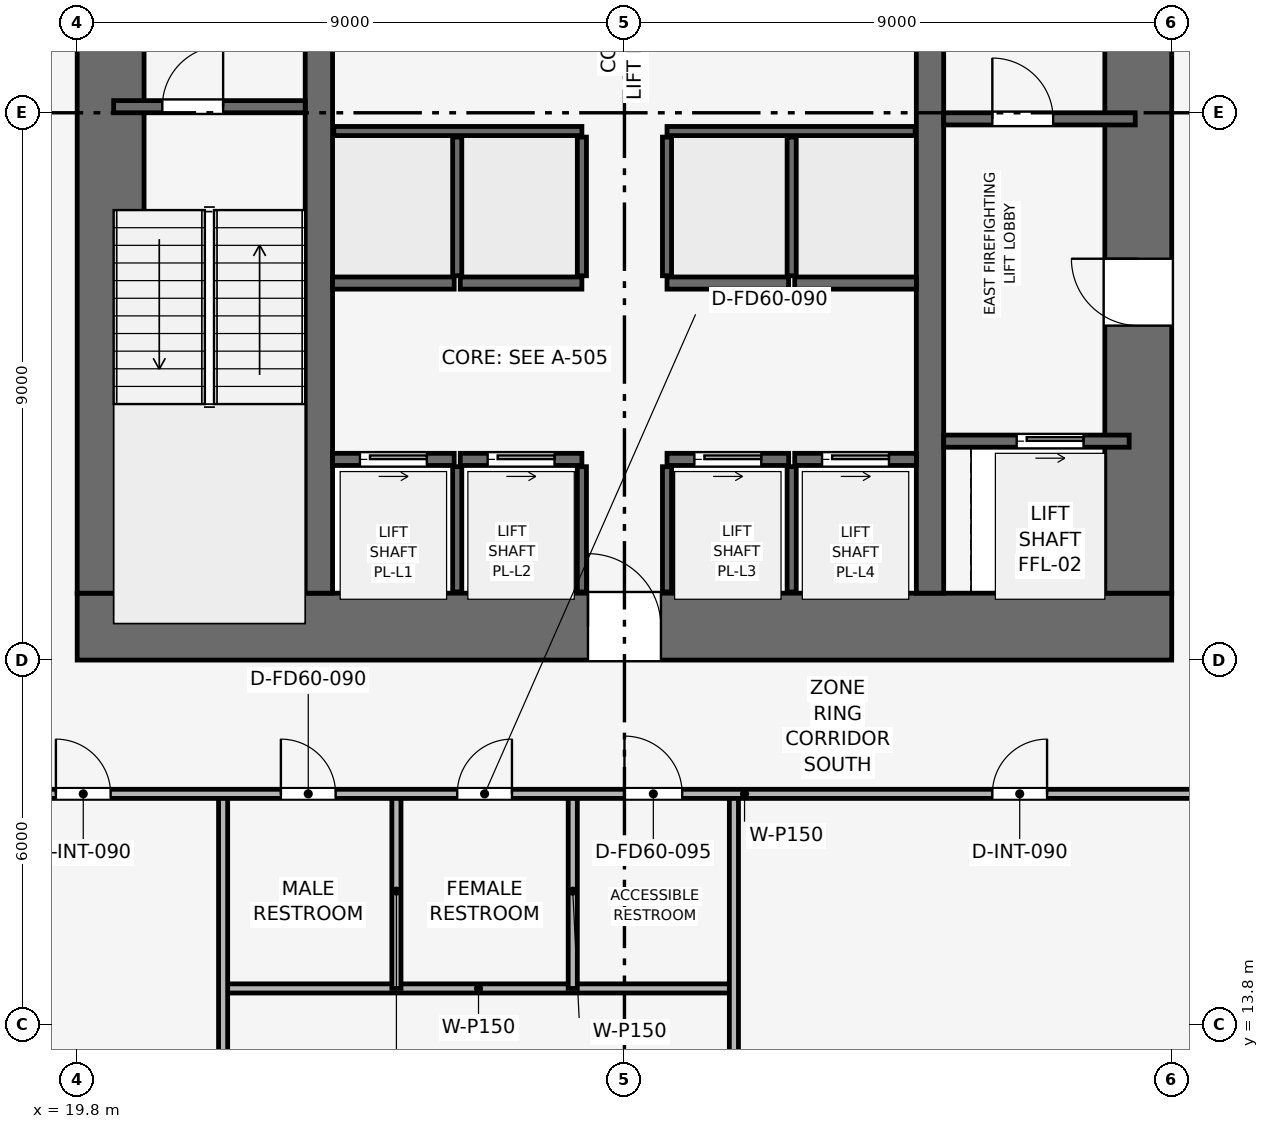
"""IFC4 building model, lengths in metres.
Left out: names, types, materials, properties, quantities, classifications, styles, units other than length and angle.
Written with IfcOpenShell. Run it as: python <this file> out.ifc"""

import sys

from ifc_helpers import new_model, si_unit, direction, frame, frame_2d, origin, place, context, subcontext, project, spatial, rectangle, extrude, element, fill, save


model = new_model("IFC4")
c1 = context("Model", 3, precision=1e-05, world=origin(), true_north=direction((0.0, 1.0)))
c2 = subcontext(c1, "Body", "Model", "MODEL_VIEW")
j1 = project(units=[si_unit("LENGTHUNIT", "METRE"), si_unit("PLANEANGLEUNIT", "RADIAN")], contexts=[c1])
p1 = place(None, origin())
s1 = spatial("IfcSite", under=j1, at=p1, CompositionType="ELEMENT")
p2 = place(p1, origin())
s2 = spatial("IfcBuilding", under=s1, at=p2, CompositionType="ELEMENT")
p3 = place(p2, frame((0.0, 0.0, 92.4)))
s3 = spatial("IfcBuildingStorey", under=s2, at=p3, CompositionType="ELEMENT", Elevation=92.4)
p4 = place(p3, frame((19.8, 20.35, 0.0), z_axis=(0.0, 0.0, 1.0), x_axis=(1.0, 0.0, 0.0)))
e1 = element("IfcWall", 1, at=p4, inside=s3, PredefinedType="SHEAR", context=c2, shape_type="SweptSolid", body=[
    extrude(rectangle(XDim=18.0, YDim=1.1, at=frame_2d((9.0, 0.0))), origin(), (0.0, 0.0, 1.0), 3.9),
])
p5 = place(p4, frame((8.4, 0.0, 0.0)))
e2 = element("IfcOpeningElement", 2, at=p5, cuts=e1, PredefinedType="OPENING", context=c2, shape_type="SweptSolid", body=[
    extrude(rectangle(XDim=1.2, YDim=2.2, at=frame_2d((0.6, 1.1))), frame((0.0, 0.56, 0.0), z_axis=(0.0, -1.0, 0.0), x_axis=(1.0, 0.0, 0.0)), (0.0, 0.0, 1.0), 1.12),
])
p6 = place(p3, frame((20.35, 20.9, 0.0), z_axis=(0.0, 0.0, 1.0), x_axis=(0.0, 1.0, 0.0)))
e3 = element("IfcWall", 3, at=p6, inside=s3, PredefinedType="SHEAR", context=c2, shape_type="SweptSolid", body=[
    extrude(rectangle(XDim=15.8, YDim=1.1, at=frame_2d((7.9, 0.0))), origin(), (0.0, 0.0, 1.0), 3.9),
])
p7 = place(p6, frame((9.9, 0.0, 0.0)))
e4 = element("IfcOpeningElement", 4, at=p7, cuts=e3, PredefinedType="OPENING", context=c2, shape_type="SweptSolid", body=[
    extrude(rectangle(XDim=1.1, YDim=2.15, at=frame_2d((0.55, 1.075))), frame((0.0, 0.56, 0.0), z_axis=(0.0, -1.0, 0.0), x_axis=(1.0, 0.0, 0.0)), (0.0, 0.0, 1.0), 1.12),
])
p8 = place(p3, frame((37.25, 20.9, 0.0), z_axis=(0.0, 0.0, 1.0), x_axis=(0.0, 1.0, 0.0)))
e5 = element("IfcWall", 5, at=p8, inside=s3, PredefinedType="SHEAR", context=c2, shape_type="SweptSolid", body=[
    extrude(rectangle(XDim=15.8, YDim=1.1, at=frame_2d((7.9, 0.0))), origin(), (0.0, 0.0, 1.0), 3.9),
])
p9 = place(p8, frame((4.4, 0.0, 0.0)))
e6 = element("IfcOpeningElement", 6, at=p9, cuts=e5, PredefinedType="OPENING", context=c2, shape_type="SweptSolid", body=[
    extrude(rectangle(XDim=1.1, YDim=2.15, at=frame_2d((0.55, 1.075))), frame((0.0, 0.56, 0.0), z_axis=(0.0, -1.0, 0.0), x_axis=(1.0, 0.0, 0.0)), (0.0, 0.0, 1.0), 1.12),
])
for number, where, z_axis, x_axis in (
    (7, (23.775, 20.9, 0.0), (0.0, 0.0, 1.0), (0.0, 1.0, 0.0)),
    (8, (33.825, 20.9, 0.0), (0.0, 0.0, 1.0), (0.0, 1.0, 0.0)),
):
    element("IfcWall", number, at=place(p3, frame(where, z_axis=z_axis, x_axis=x_axis)), inside=s3, PredefinedType="SHEAR", context=c2, shape_type="SweptSolid", body=[
        extrude(rectangle(XDim=15.8, YDim=0.45, at=frame_2d((7.9, 0.0))), origin(), (0.0, 0.0, 1.0), 3.9),
    ])
p10 = place(p3, frame((20.4, 28.9, 0.0), z_axis=(0.0, 0.0, 1.0), x_axis=(1.0, 0.0, 0.0)))
e9 = element("IfcWall", 9, at=p10, inside=s3, PredefinedType="SHEAR", context=c2, shape_type="SweptSolid", body=[
    extrude(rectangle(XDim=3.15, YDim=0.2, at=frame_2d((1.575, 0.0))), origin(), (0.0, 0.0, 1.0), 3.65),
])
p11 = place(p10, frame((0.8, 0.0, 0.0)))
e10 = element("IfcOpeningElement", 10, at=p11, cuts=e9, PredefinedType="OPENING", context=c2, shape_type="SweptSolid", body=[
    extrude(rectangle(XDim=1.0, YDim=2.1, at=frame_2d((0.5, 1.05))), frame((0.0, 0.11, 0.0), z_axis=(0.0, -1.0, 0.0), x_axis=(1.0, 0.0, 0.0)), (0.0, 0.0, 1.0), 0.22),
])
p12 = place(p3, frame((34.05, 28.7, 0.0), z_axis=(0.0, 0.0, 1.0), x_axis=(1.0, 0.0, 0.0)))
e11 = element("IfcWall", 11, at=p12, inside=s3, PredefinedType="SHEAR", context=c2, shape_type="SweptSolid", body=[
    extrude(rectangle(XDim=3.15, YDim=0.2, at=frame_2d((1.575, 0.0))), origin(), (0.0, 0.0, 1.0), 3.65),
])
p13 = place(p12, frame((0.8, 0.0, 0.0)))
e12 = element("IfcOpeningElement", 12, at=p13, cuts=e11, PredefinedType="OPENING", context=c2, shape_type="SweptSolid", body=[
    extrude(rectangle(XDim=1.0, YDim=2.1, at=frame_2d((0.5, 1.05))), frame((0.0, 0.11, 0.0), z_axis=(0.0, -1.0, 0.0), x_axis=(1.0, 0.0, 0.0)), (0.0, 0.0, 1.0), 0.22),
])
p14 = place(p3, frame((34.05, 23.4, 0.0), z_axis=(0.0, 0.0, 1.0), x_axis=(1.0, 0.0, 0.0)))
e13 = element("IfcWall", 13, at=p14, inside=s3, PredefinedType="SHEAR", context=c2, shape_type="SweptSolid", body=[
    extrude(rectangle(XDim=3.05, YDim=0.2, at=frame_2d((1.525, 0.0))), origin(), (0.0, 0.0, 1.0), 3.65),
])
p15 = place(p14, frame((1.2, 0.0, 0.0)))
e14 = element("IfcOpeningElement", 14, at=p15, cuts=e13, PredefinedType="OPENING", context=c2, shape_type="SweptSolid", body=[
    extrude(rectangle(XDim=1.1, YDim=2.15, at=frame_2d((0.55, 1.075))), frame((0.0, 0.11, 0.0), z_axis=(0.0, -1.0, 0.0), x_axis=(1.0, 0.0, 0.0)), (0.0, 0.0, 1.0), 0.22),
])
p16 = place(p3, frame((24.0, 23.1, 0.0), z_axis=(0.0, 0.0, 1.0), x_axis=(1.0, 0.0, 0.0)))
e15 = element("IfcWall", 15, at=p16, inside=s3, PredefinedType="SHEAR", context=c2, shape_type="SweptSolid", body=[
    extrude(rectangle(XDim=2.0, YDim=0.2, at=frame_2d((1.0, 0.0))), origin(), (0.0, 0.0, 1.0), 3.65),
])
p17 = place(p16, frame((0.45, 0.0, 0.0)))
e16 = element("IfcOpeningElement", 16, at=p17, cuts=e15, PredefinedType="OPENING", context=c2, shape_type="SweptSolid", body=[
    extrude(rectangle(XDim=1.1, YDim=2.15, at=frame_2d((0.55, 1.075))), frame((0.0, 0.11, 0.0), z_axis=(0.0, -1.0, 0.0), x_axis=(1.0, 0.0, 0.0)), (0.0, 0.0, 1.0), 0.22),
])
p18 = place(p3, frame((26.1, 23.1, 0.0), z_axis=(0.0, 0.0, 1.0), x_axis=(1.0, 0.0, 0.0)))
e17 = element("IfcWall", 17, at=p18, inside=s3, PredefinedType="SHEAR", context=c2, shape_type="SweptSolid", body=[
    extrude(rectangle(XDim=2.0, YDim=0.2, at=frame_2d((1.0, 0.0))), origin(), (0.0, 0.0, 1.0), 3.65),
])
p19 = place(p18, frame((0.45, 0.0, 0.0)))
e18 = element("IfcOpeningElement", 18, at=p19, cuts=e17, PredefinedType="OPENING", context=c2, shape_type="SweptSolid", body=[
    extrude(rectangle(XDim=1.1, YDim=2.15, at=frame_2d((0.55, 1.075))), frame((0.0, 0.11, 0.0), z_axis=(0.0, -1.0, 0.0), x_axis=(1.0, 0.0, 0.0)), (0.0, 0.0, 1.0), 0.22),
])
p20 = place(p3, frame((29.5, 23.1, 0.0), z_axis=(0.0, 0.0, 1.0), x_axis=(1.0, 0.0, 0.0)))
e19 = element("IfcWall", 19, at=p20, inside=s3, PredefinedType="SHEAR", context=c2, shape_type="SweptSolid", body=[
    extrude(rectangle(XDim=2.0, YDim=0.2, at=frame_2d((1.0, 0.0))), origin(), (0.0, 0.0, 1.0), 3.65),
])
p21 = place(p20, frame((0.45, 0.0, 0.0)))
e20 = element("IfcOpeningElement", 20, at=p21, cuts=e19, PredefinedType="OPENING", context=c2, shape_type="SweptSolid", body=[
    extrude(rectangle(XDim=1.1, YDim=2.15, at=frame_2d((0.55, 1.075))), frame((0.0, 0.11, 0.0), z_axis=(0.0, -1.0, 0.0), x_axis=(1.0, 0.0, 0.0)), (0.0, 0.0, 1.0), 0.22),
])
p22 = place(p3, frame((31.6, 23.1, 0.0), z_axis=(0.0, 0.0, 1.0), x_axis=(1.0, 0.0, 0.0)))
e21 = element("IfcWall", 21, at=p22, inside=s3, PredefinedType="SHEAR", context=c2, shape_type="SweptSolid", body=[
    extrude(rectangle(XDim=2.0, YDim=0.2, at=frame_2d((1.0, 0.0))), origin(), (0.0, 0.0, 1.0), 3.65),
])
p23 = place(p22, frame((0.45, 0.0, 0.0)))
e22 = element("IfcOpeningElement", 22, at=p23, cuts=e21, PredefinedType="OPENING", context=c2, shape_type="SweptSolid", body=[
    extrude(rectangle(XDim=1.1, YDim=2.15, at=frame_2d((0.55, 1.075))), frame((0.0, 0.11, 0.0), z_axis=(0.0, -1.0, 0.0), x_axis=(1.0, 0.0, 0.0)), (0.0, 0.0, 1.0), 0.22),
])
for number, where, z_axis, x_axis in (
    (23, (24.0, 26.0, 0.0), (0.0, 0.0, 1.0), (1.0, 0.0, 0.0)),
    (24, (26.1, 26.0, 0.0), (0.0, 0.0, 1.0), (1.0, 0.0, 0.0)),
    (25, (29.5, 26.0, 0.0), (0.0, 0.0, 1.0), (1.0, 0.0, 0.0)),
    (26, (31.6, 26.0, 0.0), (0.0, 0.0, 1.0), (1.0, 0.0, 0.0)),
):
    element("IfcWall", number, at=place(p3, frame(where, z_axis=z_axis, x_axis=x_axis)), inside=s3, PredefinedType="SHEAR", context=c2, shape_type="SweptSolid", body=[
        extrude(rectangle(XDim=2.0, YDim=0.2, at=frame_2d((1.0, 0.0))), origin(), (0.0, 0.0, 1.0), 3.65),
    ])
for number, where, z_axis, x_axis in (
    (27, (26.05, 20.92, 0.0), (0.0, 0.0, 1.0), (0.0, 1.0, 0.0)),
    (28, (28.1, 20.92, 0.0), (0.0, 0.0, 1.0), (0.0, 1.0, 0.0)),
    (29, (29.5, 20.92, 0.0), (0.0, 0.0, 1.0), (0.0, 1.0, 0.0)),
    (30, (31.55, 20.92, 0.0), (0.0, 0.0, 1.0), (0.0, 1.0, 0.0)),
):
    element("IfcWall", number, at=place(p3, frame(where, z_axis=z_axis, x_axis=x_axis)), inside=s3, PredefinedType="SHEAR", context=c2, shape_type="SweptSolid", body=[
        extrude(rectangle(XDim=2.06, YDim=0.15, at=frame_2d((1.03, 0.0))), origin(), (0.0, 0.0, 1.0), 3.65),
    ])
for number, where, z_axis, x_axis in (
    (31, (24.02, 28.5, 0.0), (0.0, 0.0, 1.0), (1.0, 0.0, 0.0)),
    (32, (29.5, 28.5, 0.0), (0.0, 0.0, 1.0), (1.0, 0.0, 0.0)),
):
    element("IfcWall", number, at=place(p3, frame(where, z_axis=z_axis, x_axis=x_axis)), inside=s3, PredefinedType="SHEAR", context=c2, shape_type="SweptSolid", body=[
        extrude(rectangle(XDim=4.08, YDim=0.15, at=frame_2d((2.04, 0.0))), origin(), (0.0, 0.0, 1.0), 3.65),
    ])
for number, where, z_axis, x_axis in (
    (33, (26.05, 26.12, 0.0), (0.0, 0.0, 1.0), (0.0, 1.0, 0.0)),
    (34, (28.1, 26.12, 0.0), (0.0, 0.0, 1.0), (0.0, 1.0, 0.0)),
    (35, (29.5, 26.12, 0.0), (0.0, 0.0, 1.0), (0.0, 1.0, 0.0)),
    (36, (31.55, 26.12, 0.0), (0.0, 0.0, 1.0), (0.0, 1.0, 0.0)),
):
    element("IfcWall", number, at=place(p3, frame(where, z_axis=z_axis, x_axis=x_axis)), inside=s3, PredefinedType="SHEAR", context=c2, shape_type="SweptSolid", body=[
        extrude(rectangle(XDim=2.28, YDim=0.15, at=frame_2d((1.14, 0.0))), origin(), (0.0, 0.0, 1.0), 3.65),
    ])
p24 = place(p3, frame((22.2, 14.4, 0.0), z_axis=(0.0, 0.0, 1.0), x_axis=(1.0, 0.0, 0.0)))
e37 = element("IfcWall", 37, at=p24, inside=s3, PredefinedType="PARTITIONING", context=c2, shape_type="SweptSolid", body=[
    extrude(rectangle(XDim=8.4, YDim=0.15, at=frame_2d((4.2, 0.0))), origin(), (0.0, 0.0, 1.0), 3.085),
])
p25 = place(p3, frame((22.2, 1.03, 0.0), z_axis=(0.0, 0.0, 1.0), x_axis=(0.0, 1.0, 0.0)))
e38 = element("IfcWall", 38, at=p25, inside=s3, PredefinedType="PARTITIONING", context=c2, shape_type="SweptSolid", body=[
    extrude(rectangle(XDim=16.57, YDim=0.15, at=frame_2d((8.285, 0.0))), origin(), (0.0, 0.0, 1.0), 2.935),
])
p26 = place(p25, frame((6.235, 0.0, 0.0)))
e39 = element("IfcOpeningElement", 39, at=p26, cuts=e38, PredefinedType="OPENING", context=c2, shape_type="SweptSolid", body=[
    extrude(rectangle(XDim=0.9, YDim=2.1, at=frame_2d((0.45, 1.05))), frame((0.0, 0.085, 0.0), z_axis=(0.0, -1.0, 0.0), x_axis=(1.0, 0.0, 0.0)), (0.0, 0.0, 1.0), 0.17),
])
p27 = place(p3, frame((30.6, 1.03, 0.0), z_axis=(0.0, 0.0, 1.0), x_axis=(0.0, 1.0, 0.0)))
e40 = element("IfcWall", 40, at=p27, inside=s3, PredefinedType="PARTITIONING", context=c2, shape_type="SweptSolid", body=[
    extrude(rectangle(XDim=16.57, YDim=0.15, at=frame_2d((8.285, 0.0))), origin(), (0.0, 0.0, 1.0), 2.935),
])
for number, where, z_axis, x_axis in (
    (41, (25.05, 14.4, 0.0), (0.0, 0.0, 1.0), (0.0, 1.0, 0.0)),
    (42, (27.95, 14.4, 0.0), (0.0, 0.0, 1.0), (0.0, 1.0, 0.0)),
):
    element("IfcWall", number, at=place(p3, frame(where, z_axis=z_axis, x_axis=x_axis)), inside=s3, PredefinedType="PARTITIONING", context=c2, shape_type="SweptSolid", body=[
        extrude(rectangle(XDim=3.2, YDim=0.15, at=frame_2d((1.6, 0.0))), origin(), (0.0, 0.0, 1.0), 3.65),
    ])
p28 = place(p3, frame((17.6, 17.6, 0.0), z_axis=(0.0, 0.0, 1.0), x_axis=(1.0, 0.0, 0.0)))
e43 = element("IfcWall", 43, at=p28, inside=s3, PredefinedType="PARTITIONING", context=c2, shape_type="SweptSolid", body=[
    extrude(rectangle(XDim=22.4, YDim=0.15, at=frame_2d((11.2, 0.0))), origin(), (0.0, 0.0, 1.0), 3.085),
])
p29 = place(p28, frame((1.85, 0.0, 0.0)))
e44 = element("IfcOpeningElement", 44, at=p29, cuts=e43, PredefinedType="OPENING", context=c2, shape_type="SweptSolid", body=[
    extrude(rectangle(XDim=0.9, YDim=2.1, at=frame_2d((0.45, 1.05))), frame((0.0, 0.085, 0.0), z_axis=(0.0, -1.0, 0.0), x_axis=(1.0, 0.0, 0.0)), (0.0, 0.0, 1.0), 0.17),
])
p30 = place(p28, frame((5.55, 0.0, 0.0)))
e45 = element("IfcOpeningElement", 45, at=p30, cuts=e43, PredefinedType="OPENING", context=c2, shape_type="SweptSolid", body=[
    extrude(rectangle(XDim=0.9, YDim=2.1, at=frame_2d((0.45, 1.05))), frame((0.0, 0.085, 0.0), z_axis=(0.0, -1.0, 0.0), x_axis=(1.0, 0.0, 0.0)), (0.0, 0.0, 1.0), 0.17),
])
p31 = place(p28, frame((8.45, 0.0, 0.0)))
e46 = element("IfcOpeningElement", 46, at=p31, cuts=e43, PredefinedType="OPENING", context=c2, shape_type="SweptSolid", body=[
    extrude(rectangle(XDim=0.9, YDim=2.1, at=frame_2d((0.45, 1.05))), frame((0.0, 0.085, 0.0), z_axis=(0.0, -1.0, 0.0), x_axis=(1.0, 0.0, 0.0)), (0.0, 0.0, 1.0), 0.17),
])
p32 = place(p28, frame((11.2, 0.0, 0.0)))
e47 = element("IfcOpeningElement", 47, at=p32, cuts=e43, PredefinedType="OPENING", context=c2, shape_type="SweptSolid", body=[
    extrude(rectangle(XDim=0.95, YDim=2.1, at=frame_2d((0.475, 1.05))), frame((0.0, 0.085, 0.0), z_axis=(0.0, -1.0, 0.0), x_axis=(1.0, 0.0, 0.0)), (0.0, 0.0, 1.0), 0.17),
])
p33 = place(p28, frame((17.25, 0.0, 0.0)))
e48 = element("IfcOpeningElement", 48, at=p33, cuts=e43, PredefinedType="OPENING", context=c2, shape_type="SweptSolid", body=[
    extrude(rectangle(XDim=0.9, YDim=2.1, at=frame_2d((0.45, 1.05))), frame((0.0, 0.085, 0.0), z_axis=(0.0, -1.0, 0.0), x_axis=(1.0, 0.0, 0.0)), (0.0, 0.0, 1.0), 0.17),
])
p34 = place(p11, origin())
e49 = element("IfcDoor", 49, at=p34, inside=s3, OperationType="SINGLE_SWING_RIGHT", PredefinedType="DOOR", context=c2, shape_type="SweptSolid", body=[
    extrude(rectangle(XDim=1.0, YDim=2.1, at=frame_2d((0.5, 1.05))), frame((0.0, 0.025, 0.0), z_axis=(0.0, -1.0, 0.0), x_axis=(1.0, 0.0, 0.0)), (0.0, 0.0, 1.0), 0.05),
])
fill(e10, e49)
p35 = place(p13, origin())
e50 = element("IfcDoor", 50, at=p35, inside=s3, OperationType="SINGLE_SWING_LEFT", PredefinedType="DOOR", context=c2, shape_type="SweptSolid", body=[
    extrude(rectangle(XDim=1.0, YDim=2.1, at=frame_2d((0.5, 1.05))), frame((0.0, 0.025, 0.0), z_axis=(0.0, -1.0, 0.0), x_axis=(1.0, 0.0, 0.0)), (0.0, 0.0, 1.0), 0.05),
])
fill(e12, e50)
p36 = place(p15, origin())
e51 = element("IfcDoor", 51, at=p36, inside=s3, OperationType="SLIDING_TO_RIGHT", PredefinedType="DOOR", context=c2, shape_type="SweptSolid", body=[
    extrude(rectangle(XDim=1.1, YDim=2.15, at=frame_2d((0.55, 1.075))), frame((0.0, 0.025, 0.0), z_axis=(0.0, -1.0, 0.0), x_axis=(1.0, 0.0, 0.0)), (0.0, 0.0, 1.0), 0.05),
])
fill(e14, e51)
p37 = place(p17, origin())
e52 = element("IfcDoor", 52, at=p37, inside=s3, OperationType="SLIDING_TO_RIGHT", PredefinedType="DOOR", context=c2, shape_type="SweptSolid", body=[
    extrude(rectangle(XDim=1.1, YDim=2.15, at=frame_2d((0.55, 1.075))), frame((0.0, 0.025, 0.0), z_axis=(0.0, -1.0, 0.0), x_axis=(1.0, 0.0, 0.0)), (0.0, 0.0, 1.0), 0.05),
])
fill(e16, e52)
p38 = place(p19, origin())
e53 = element("IfcDoor", 53, at=p38, inside=s3, OperationType="SLIDING_TO_RIGHT", PredefinedType="DOOR", context=c2, shape_type="SweptSolid", body=[
    extrude(rectangle(XDim=1.1, YDim=2.15, at=frame_2d((0.55, 1.075))), frame((0.0, 0.025, 0.0), z_axis=(0.0, -1.0, 0.0), x_axis=(1.0, 0.0, 0.0)), (0.0, 0.0, 1.0), 0.05),
])
fill(e18, e53)
p39 = place(p21, origin())
e54 = element("IfcDoor", 54, at=p39, inside=s3, OperationType="SLIDING_TO_RIGHT", PredefinedType="DOOR", context=c2, shape_type="SweptSolid", body=[
    extrude(rectangle(XDim=1.1, YDim=2.15, at=frame_2d((0.55, 1.075))), frame((0.0, 0.025, 0.0), z_axis=(0.0, -1.0, 0.0), x_axis=(1.0, 0.0, 0.0)), (0.0, 0.0, 1.0), 0.05),
])
fill(e20, e54)
p40 = place(p23, origin())
e55 = element("IfcDoor", 55, at=p40, inside=s3, OperationType="SLIDING_TO_RIGHT", PredefinedType="DOOR", context=c2, shape_type="SweptSolid", body=[
    extrude(rectangle(XDim=1.1, YDim=2.15, at=frame_2d((0.55, 1.075))), frame((0.0, 0.025, 0.0), z_axis=(0.0, -1.0, 0.0), x_axis=(1.0, 0.0, 0.0)), (0.0, 0.0, 1.0), 0.05),
])
fill(e22, e55)
p41 = place(p29, origin())
e56 = element("IfcDoor", 56, at=p41, inside=s3, OperationType="SINGLE_SWING_LEFT", PredefinedType="DOOR", context=c2, shape_type="SweptSolid", body=[
    extrude(rectangle(XDim=0.9, YDim=2.1, at=frame_2d((0.45, 1.05))), frame((0.0, 0.025, 0.0), z_axis=(0.0, -1.0, 0.0), x_axis=(1.0, 0.0, 0.0)), (0.0, 0.0, 1.0), 0.05),
])
fill(e44, e56)
p42 = place(p30, origin())
e57 = element("IfcDoor", 57, at=p42, inside=s3, OperationType="SINGLE_SWING_LEFT", PredefinedType="DOOR", context=c2, shape_type="SweptSolid", body=[
    extrude(rectangle(XDim=0.9, YDim=2.1, at=frame_2d((0.45, 1.05))), frame((0.0, 0.025, 0.0), z_axis=(0.0, -1.0, 0.0), x_axis=(1.0, 0.0, 0.0)), (0.0, 0.0, 1.0), 0.05),
])
fill(e45, e57)
p43 = place(p31, origin())
e58 = element("IfcDoor", 58, at=p43, inside=s3, OperationType="SINGLE_SWING_RIGHT", PredefinedType="DOOR", context=c2, shape_type="SweptSolid", body=[
    extrude(rectangle(XDim=0.9, YDim=2.1, at=frame_2d((0.45, 1.05))), frame((0.0, 0.025, 0.0), z_axis=(0.0, -1.0, 0.0), x_axis=(1.0, 0.0, 0.0)), (0.0, 0.0, 1.0), 0.05),
])
fill(e46, e58)
p44 = place(p32, origin())
e59 = element("IfcDoor", 59, at=p44, inside=s3, OperationType="SINGLE_SWING_LEFT", PredefinedType="DOOR", context=c2, shape_type="SweptSolid", body=[
    extrude(rectangle(XDim=0.95, YDim=2.1, at=frame_2d((0.475, 1.05))), frame((0.0, 0.025, 0.0), z_axis=(0.0, -1.0, 0.0), x_axis=(1.0, 0.0, 0.0)), (0.0, 0.0, 1.0), 0.05),
])
fill(e47, e59)
p45 = place(p33, origin())
e60 = element("IfcDoor", 60, at=p45, inside=s3, OperationType="SINGLE_SWING_RIGHT", PredefinedType="DOOR", context=c2, shape_type="SweptSolid", body=[
    extrude(rectangle(XDim=0.9, YDim=2.1, at=frame_2d((0.45, 1.05))), frame((0.0, 0.025, 0.0), z_axis=(0.0, -1.0, 0.0), x_axis=(1.0, 0.0, 0.0)), (0.0, 0.0, 1.0), 0.05),
])
fill(e48, e60)
p46 = place(p9, origin())
e61 = element("IfcDoor", 61, at=p46, inside=s3, OperationType="SINGLE_SWING_RIGHT", PredefinedType="DOOR", context=c2, shape_type="SweptSolid", body=[
    extrude(rectangle(XDim=1.1, YDim=2.15, at=frame_2d((0.55, 1.075))), frame((0.0, 0.025, 0.0), z_axis=(0.0, -1.0, 0.0), x_axis=(1.0, 0.0, 0.0)), (0.0, 0.0, 1.0), 0.05),
])
fill(e6, e61)
p47 = place(p5, origin())
e62 = element("IfcDoor", 62, at=p47, inside=s3, OperationType="SINGLE_SWING_LEFT", PredefinedType="DOOR", context=c2, shape_type="SweptSolid", body=[
    extrude(rectangle(XDim=1.2, YDim=2.2, at=frame_2d((0.6, 1.1))), frame((0.0, 0.025, 0.0), z_axis=(0.0, -1.0, 0.0), x_axis=(1.0, 0.0, 0.0)), (0.0, 0.0, 1.0), 0.05),
])
fill(e2, e62)
save(model, sys.argv[1])
